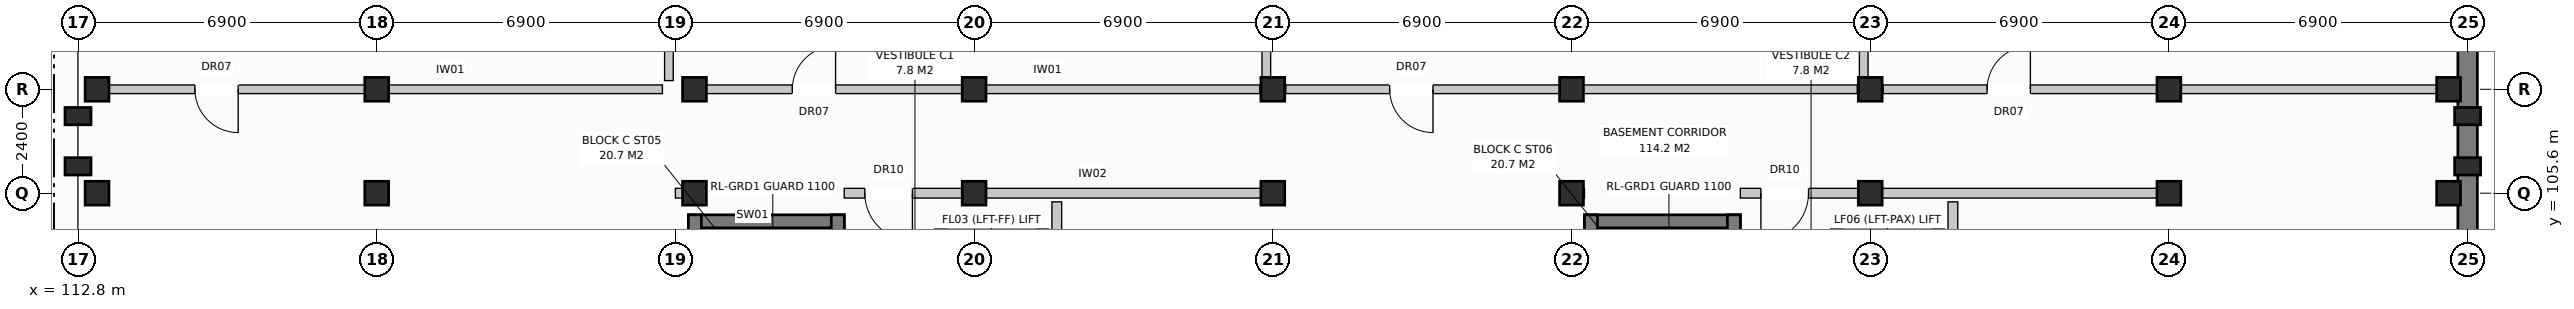
"""IFC4 building model, lengths in metres.
Left out: names, types, materials, properties, quantities, classifications, styles, units other than length and angle.
Written with IfcOpenShell. Run it as: python <this file> out.ifc"""

import sys

from ifc_helpers import new_model, si_unit, direction, frame, frame_2d, origin, origin_with_axes, origin_2d, place, context, subcontext, project, spatial, rectangle, extrude, element, fill, save


model = new_model("IFC4")
c1 = context("Model", 3, precision=1e-05, world=origin(), true_north=direction((0.0, 1.0)))
c2 = subcontext(c1, "Body", "Model", "MODEL_VIEW")
j1 = project(units=[si_unit("LENGTHUNIT", "METRE"), si_unit("PLANEANGLEUNIT", "RADIAN")], contexts=[c1])
p1 = place(None, origin())
s1 = spatial("IfcSite", under=j1, at=p1, CompositionType="ELEMENT")
p2 = place(p1, origin())
s2 = spatial("IfcBuilding", under=s1, at=p2, CompositionType="ELEMENT")
p3 = place(p2, frame((0.0, 0.0, -3.8)))
s3 = spatial("IfcBuildingStorey", under=s2, at=p3, CompositionType="ELEMENT", Elevation=-3.8)
for number, where, z_axis, x_axis in (
    (1, (113.24, 105.6, 0.0), (0.0, 0.0, 1.0), (1.0, 0.0, 0.0)),
    (2, (113.24, 108.0, 0.0), (0.0, 0.0, 1.0), (1.0, 0.0, 0.0)),
    (3, (119.7, 105.6, 0.0), (0.0, 0.0, 1.0), (1.0, 0.0, 0.0)),
    (4, (119.7, 108.0, 0.0), (0.0, 0.0, 1.0), (1.0, 0.0, 0.0)),
    (5, (127.04, 105.6, 0.0), (0.0, 0.0, 1.0), (1.0, 0.0, 0.0)),
    (6, (127.04, 108.0, 0.0), (0.0, 0.0, 1.0), (1.0, 0.0, 0.0)),
    (7, (133.5, 105.6, 0.0), (0.0, 0.0, 1.0), (1.0, 0.0, 0.0)),
    (8, (133.5, 108.0, 0.0), (0.0, 0.0, 1.0), (1.0, 0.0, 0.0)),
    (9, (140.4, 105.6, 0.0), (0.0, 0.0, 1.0), (1.0, 0.0, 0.0)),
    (10, (140.4, 108.0, 0.0), (0.0, 0.0, 1.0), (1.0, 0.0, 0.0)),
    (11, (147.3, 105.6, 0.0), (0.0, 0.0, 1.0), (1.0, 0.0, 0.0)),
    (12, (147.3, 108.0, 0.0), (0.0, 0.0, 1.0), (1.0, 0.0, 0.0)),
    (13, (154.2, 105.6, 0.0), (0.0, 0.0, 1.0), (1.0, 0.0, 0.0)),
    (14, (154.2, 108.0, 0.0), (0.0, 0.0, 1.0), (1.0, 0.0, 0.0)),
    (15, (161.1, 105.6, 0.0), (0.0, 0.0, 1.0), (1.0, 0.0, 0.0)),
    (16, (161.1, 108.0, 0.0), (0.0, 0.0, 1.0), (1.0, 0.0, 0.0)),
    (17, (167.56, 105.6, 0.0), (0.0, 0.0, 1.0), (1.0, 0.0, 0.0)),
    (18, (167.56, 108.0, 0.0), (0.0, 0.0, 1.0), (1.0, 0.0, 0.0)),
):
    element("IfcColumn", number, at=place(p3, frame(where, z_axis=z_axis, x_axis=x_axis)), inside=s3, PredefinedType="COLUMN", context=c2, shape_type="SweptSolid", body=[
        extrude(rectangle(XDim=0.55, YDim=0.55, at=origin_2d()), origin(), (0.0, 0.0, 1.0), 3.8),
    ])
for number, where, z_axis, x_axis in (
    (19, (168.0, 106.22, 0.0), (0.0, 0.0, 1.0), (0.0, 1.0, 0.0)),
    (20, (168.0, 107.38, 0.0), (0.0, 0.0, 1.0), (0.0, 1.0, 0.0)),
    (21, (112.8, 106.22, 0.0), (0.0, 0.0, 1.0), (0.0, 1.0, 0.0)),
    (22, (112.8, 107.38, 0.0), (0.0, 0.0, 1.0), (0.0, 1.0, 0.0)),
):
    element("IfcColumn", number, at=place(p3, frame(where, z_axis=z_axis, x_axis=x_axis)), inside=s3, PredefinedType="PILASTER", context=c2, shape_type="SweptSolid", body=[
        extrude(rectangle(XDim=0.4, YDim=0.6, at=origin_2d()), origin(), (0.0, 0.0, 1.0), 3.8),
    ])
p4 = place(p3, frame((168.0, 0.0, 0.0), z_axis=(0.0, 0.0, 1.0), x_axis=(0.0, 1.0, 0.0)))
e23 = element("IfcWall", 23, at=p4, inside=s3, PredefinedType="STANDARD", context=c2, shape_type="SweptSolid", body=[
    extrude(rectangle(XDim=116.0, YDim=0.45, at=frame_2d((58.0, 0.0))), origin(), (0.0, 0.0, 1.0), 3.48),
])
p5 = place(p3, frame((126.9, 104.95, 0.0), z_axis=(0.0, 0.0, 1.0), x_axis=(1.0, 0.0, 0.0)))
e24 = element("IfcWall", 24, at=p5, inside=s3, PredefinedType="SHEAR", context=c2, shape_type="SweptSolid", body=[
    extrude(rectangle(XDim=3.6, YDim=0.3, at=frame_2d((1.8, 0.0))), origin(), (0.0, 0.0, 1.0), 3.48),
])
p6 = place(p3, frame((127.05, 97.6, 0.0), z_axis=(0.0, 0.0, 1.0), x_axis=(0.0, 1.0, 0.0)))
e25 = element("IfcWall", 25, at=p6, inside=s3, PredefinedType="SHEAR", context=c2, shape_type="SweptSolid", body=[
    extrude(rectangle(XDim=7.5, YDim=0.3, at=frame_2d((3.75, 0.0))), origin(), (0.0, 0.0, 1.0), 3.48),
])
p7 = place(p3, frame((130.35, 97.6, 0.0), z_axis=(0.0, 0.0, 1.0), x_axis=(0.0, 1.0, 0.0)))
e26 = element("IfcWall", 26, at=p7, inside=s3, PredefinedType="SHEAR", context=c2, shape_type="SweptSolid", body=[
    extrude(rectangle(XDim=7.5, YDim=0.3, at=frame_2d((3.75, 0.0))), origin(), (0.0, 0.0, 1.0), 3.48),
])
p8 = place(p7, frame((0.65, 0.0, 0.0)))
e27 = element("IfcOpeningElement", 27, at=p8, cuts=e26, PredefinedType="OPENING", context=c2, shape_type="SweptSolid", body=[
    extrude(rectangle(XDim=1.15, YDim=2.15, at=frame_2d((0.575, 1.075))), frame((0.0, 0.162, 0.0), z_axis=(0.0, -1.0, 0.0), x_axis=(1.0, 0.0, 0.0)), (0.0, 0.0, 1.0), 0.324),
])
p9 = place(p3, frame((135.41, 97.8, 0.0), z_axis=(0.0, 0.0, 1.0), x_axis=(0.0, 1.0, 0.0)))
e28 = element("IfcWall", 28, at=p9, inside=s3, PredefinedType="PARTITIONING", context=c2, shape_type="SweptSolid", body=[
    extrude(rectangle(XDim=7.6, YDim=0.225, at=frame_2d((3.8, 0.0))), origin(), (0.0, 0.0, 1.0), 3.19),
])
p10 = place(p3, frame((126.6, 105.6, 0.0), z_axis=(0.0, 0.0, 1.0), x_axis=(1.0, 0.0, 0.0)))
e29 = element("IfcWall", 29, at=p10, inside=s3, PredefinedType="PARTITIONING", context=c2, shape_type="SweptSolid", body=[
    extrude(rectangle(XDim=0.3, YDim=0.225, at=frame_2d((0.15, 0.0))), origin(), (0.0, 0.0, 1.0), 3.48),
])
p11 = place(p3, frame((130.5, 105.6, 0.0), z_axis=(0.0, 0.0, 1.0), x_axis=(1.0, 0.0, 0.0)))
e30 = element("IfcWall", 30, at=p11, inside=s3, PredefinedType="PARTITIONING", context=c2, shape_type="SweptSolid", body=[
    extrude(rectangle(XDim=9.9, YDim=0.225, at=frame_2d((4.95, 0.0))), origin(), (0.0, 0.0, 1.0), 2.92),
])
p12 = place(p11, frame((0.475, 0.0, 0.0)))
e31 = element("IfcOpeningElement", 31, at=p12, cuts=e30, PredefinedType="OPENING", context=c2, shape_type="SweptSolid", body=[
    extrude(rectangle(XDim=1.1, YDim=2.15, at=frame_2d((0.55, 1.075))), frame((0.0, 0.125, 0.0), z_axis=(0.0, -1.0, 0.0), x_axis=(1.0, 0.0, 0.0)), (0.0, 0.0, 1.0), 0.249),
])
p13 = place(p3, frame((147.6, 104.95, 0.0), z_axis=(0.0, 0.0, 1.0), x_axis=(1.0, 0.0, 0.0)))
e32 = element("IfcWall", 32, at=p13, inside=s3, PredefinedType="SHEAR", context=c2, shape_type="SweptSolid", body=[
    extrude(rectangle(XDim=3.6, YDim=0.3, at=frame_2d((1.8, 0.0))), origin(), (0.0, 0.0, 1.0), 3.48),
])
p14 = place(p3, frame((147.75, 97.6, 0.0), z_axis=(0.0, 0.0, 1.0), x_axis=(0.0, 1.0, 0.0)))
e33 = element("IfcWall", 33, at=p14, inside=s3, PredefinedType="SHEAR", context=c2, shape_type="SweptSolid", body=[
    extrude(rectangle(XDim=7.5, YDim=0.3, at=frame_2d((3.75, 0.0))), origin(), (0.0, 0.0, 1.0), 3.48),
])
p15 = place(p3, frame((151.05, 97.6, 0.0), z_axis=(0.0, 0.0, 1.0), x_axis=(0.0, 1.0, 0.0)))
e34 = element("IfcWall", 34, at=p15, inside=s3, PredefinedType="SHEAR", context=c2, shape_type="SweptSolid", body=[
    extrude(rectangle(XDim=7.5, YDim=0.3, at=frame_2d((3.75, 0.0))), origin(), (0.0, 0.0, 1.0), 3.48),
])
p16 = place(p15, frame((0.65, 0.0, 0.0)))
e35 = element("IfcOpeningElement", 35, at=p16, cuts=e34, PredefinedType="OPENING", context=c2, shape_type="SweptSolid", body=[
    extrude(rectangle(XDim=1.15, YDim=2.15, at=frame_2d((0.575, 1.075))), frame((0.0, 0.162, 0.0), z_axis=(0.0, -1.0, 0.0), x_axis=(1.0, 0.0, 0.0)), (0.0, 0.0, 1.0), 0.324),
])
p17 = place(p3, frame((156.11, 97.8, 0.0), z_axis=(0.0, 0.0, 1.0), x_axis=(0.0, 1.0, 0.0)))
e36 = element("IfcWall", 36, at=p17, inside=s3, PredefinedType="PARTITIONING", context=c2, shape_type="SweptSolid", body=[
    extrude(rectangle(XDim=7.6, YDim=0.225, at=frame_2d((3.8, 0.0))), origin(), (0.0, 0.0, 1.0), 3.19),
])
p18 = place(p3, frame((147.3, 105.6, 0.0), z_axis=(0.0, 0.0, 1.0), x_axis=(1.0, 0.0, 0.0)))
e37 = element("IfcWall", 37, at=p18, inside=s3, PredefinedType="PARTITIONING", context=c2, shape_type="SweptSolid", body=[
    extrude(rectangle(XDim=0.3, YDim=0.225, at=frame_2d((0.15, 0.0))), origin(), (0.0, 0.0, 1.0), 3.48),
])
p19 = place(p3, frame((151.2, 105.6, 0.0), z_axis=(0.0, 0.0, 1.0), x_axis=(1.0, 0.0, 0.0)))
e38 = element("IfcWall", 38, at=p19, inside=s3, PredefinedType="PARTITIONING", context=c2, shape_type="SweptSolid", body=[
    extrude(rectangle(XDim=9.9, YDim=0.225, at=frame_2d((4.95, 0.0))), origin(), (0.0, 0.0, 1.0), 2.92),
])
p20 = place(p19, frame((0.475, 0.0, 0.0)))
e39 = element("IfcOpeningElement", 39, at=p20, cuts=e38, PredefinedType="OPENING", context=c2, shape_type="SweptSolid", body=[
    extrude(rectangle(XDim=1.1, YDim=2.15, at=frame_2d((0.55, 1.075))), frame((0.0, 0.125, 0.0), z_axis=(0.0, -1.0, 0.0), x_axis=(1.0, 0.0, 0.0)), (0.0, 0.0, 1.0), 0.249),
])
p21 = place(p3, frame((113.1, 108.0, 0.0), z_axis=(0.0, 0.0, 1.0), x_axis=(1.0, 0.0, 0.0)))
e40 = element("IfcWall", 40, at=p21, inside=s3, PredefinedType="PARTITIONING", context=c2, shape_type="SweptSolid", body=[
    extrude(rectangle(XDim=13.2, YDim=0.2, at=frame_2d((6.6, 0.0))), origin(), (0.0, 0.0, 1.0), 2.92),
])
p22 = place(p21, frame((2.4, 0.0, 0.0)))
e41 = element("IfcOpeningElement", 41, at=p22, cuts=e40, PredefinedType="OPENING", context=c2, shape_type="SweptSolid", body=[
    extrude(rectangle(XDim=1.0, YDim=2.15, at=frame_2d((0.5, 1.075))), frame((0.0, 0.112, 0.0), z_axis=(0.0, -1.0, 0.0), x_axis=(1.0, 0.0, 0.0)), (0.0, 0.0, 1.0), 0.224),
])
p23 = place(p3, frame((126.45, 108.2, 0.0), z_axis=(0.0, 0.0, 1.0), x_axis=(0.0, 1.0, 0.0)))
e42 = element("IfcWall", 42, at=p23, inside=s3, PredefinedType="PARTITIONING", context=c2, shape_type="SweptSolid", body=[
    extrude(rectangle(XDim=7.5, YDim=0.2, at=frame_2d((3.75, 0.0))), origin(), (0.0, 0.0, 1.0), 3.48),
])
p24 = place(p3, frame((126.9, 108.0, 0.0), z_axis=(0.0, 0.0, 1.0), x_axis=(1.0, 0.0, 0.0)))
e43 = element("IfcWall", 43, at=p24, inside=s3, PredefinedType="PARTITIONING", context=c2, shape_type="SweptSolid", body=[
    extrude(rectangle(XDim=13.2, YDim=0.2, at=frame_2d((6.6, 0.0))), origin(), (0.0, 0.0, 1.0), 2.92),
])
p25 = place(p24, frame((2.4, 0.0, 0.0)))
e44 = element("IfcOpeningElement", 44, at=p25, cuts=e43, PredefinedType="OPENING", context=c2, shape_type="SweptSolid", body=[
    extrude(rectangle(XDim=1.0, YDim=2.15, at=frame_2d((0.5, 1.075))), frame((0.0, 0.112, 0.0), z_axis=(0.0, -1.0, 0.0), x_axis=(1.0, 0.0, 0.0)), (0.0, 0.0, 1.0), 0.224),
])
p26 = place(p3, frame((140.25, 108.2, 0.0), z_axis=(0.0, 0.0, 1.0), x_axis=(0.0, 1.0, 0.0)))
e45 = element("IfcWall", 45, at=p26, inside=s3, PredefinedType="PARTITIONING", context=c2, shape_type="SweptSolid", body=[
    extrude(rectangle(XDim=7.5, YDim=0.2, at=frame_2d((3.75, 0.0))), origin(), (0.0, 0.0, 1.0), 3.48),
])
p27 = place(p3, frame((140.7, 108.0, 0.0), z_axis=(0.0, 0.0, 1.0), x_axis=(1.0, 0.0, 0.0)))
e46 = element("IfcWall", 46, at=p27, inside=s3, PredefinedType="PARTITIONING", context=c2, shape_type="SweptSolid", body=[
    extrude(rectangle(XDim=13.2, YDim=0.2, at=frame_2d((6.6, 0.0))), origin(), (0.0, 0.0, 1.0), 2.92),
])
p28 = place(p27, frame((2.4, 0.0, 0.0)))
e47 = element("IfcOpeningElement", 47, at=p28, cuts=e46, PredefinedType="OPENING", context=c2, shape_type="SweptSolid", body=[
    extrude(rectangle(XDim=1.0, YDim=2.15, at=frame_2d((0.5, 1.075))), frame((0.0, 0.112, 0.0), z_axis=(0.0, -1.0, 0.0), x_axis=(1.0, 0.0, 0.0)), (0.0, 0.0, 1.0), 0.224),
])
p29 = place(p3, frame((154.05, 108.2, 0.0), z_axis=(0.0, 0.0, 1.0), x_axis=(0.0, 1.0, 0.0)))
e48 = element("IfcWall", 48, at=p29, inside=s3, PredefinedType="PARTITIONING", context=c2, shape_type="SweptSolid", body=[
    extrude(rectangle(XDim=7.5, YDim=0.2, at=frame_2d((3.75, 0.0))), origin(), (0.0, 0.0, 1.0), 3.48),
])
p30 = place(p3, frame((154.5, 108.0, 0.0), z_axis=(0.0, 0.0, 1.0), x_axis=(1.0, 0.0, 0.0)))
e49 = element("IfcWall", 49, at=p30, inside=s3, PredefinedType="PARTITIONING", context=c2, shape_type="SweptSolid", body=[
    extrude(rectangle(XDim=13.2, YDim=0.2, at=frame_2d((6.6, 0.0))), origin(), (0.0, 0.0, 1.0), 2.92),
])
p31 = place(p30, frame((2.4, 0.0, 0.0)))
e50 = element("IfcOpeningElement", 50, at=p31, cuts=e49, PredefinedType="OPENING", context=c2, shape_type="SweptSolid", body=[
    extrude(rectangle(XDim=1.0, YDim=2.15, at=frame_2d((0.5, 1.075))), frame((0.0, 0.112, 0.0), z_axis=(0.0, -1.0, 0.0), x_axis=(1.0, 0.0, 0.0)), (0.0, 0.0, 1.0), 0.224),
])
p32 = place(p12, frame((1.1, 0.0, 0.0), z_axis=(0.0, 0.0, 1.0), x_axis=(-1.0, 0.0, 0.0)))
e51 = element("IfcDoor", 51, at=p32, inside=s3, OperationType="SINGLE_SWING_RIGHT", PredefinedType="DOOR", context=c2, shape_type="SweptSolid", body=[
    extrude(rectangle(XDim=1.1, YDim=2.15, at=frame_2d((0.55, 1.075))), frame((0.0, 0.025, 0.0), z_axis=(0.0, -1.0, 0.0), x_axis=(1.0, 0.0, 0.0)), (0.0, 0.0, 1.0), 0.05),
])
fill(e31, e51)
p33 = place(p20, frame((1.1, 0.0, 0.0), z_axis=(0.0, 0.0, 1.0), x_axis=(-1.0, 0.0, 0.0)))
e52 = element("IfcDoor", 52, at=p33, inside=s3, OperationType="SINGLE_SWING_LEFT", PredefinedType="DOOR", context=c2, shape_type="SweptSolid", body=[
    extrude(rectangle(XDim=1.1, YDim=2.15, at=frame_2d((0.55, 1.075))), frame((0.0, 0.025, 0.0), z_axis=(0.0, -1.0, 0.0), x_axis=(1.0, 0.0, 0.0)), (0.0, 0.0, 1.0), 0.05),
])
fill(e39, e52)
p34 = place(p22, frame((1.0, 0.0, 0.0), z_axis=(0.0, 0.0, 1.0), x_axis=(-1.0, 0.0, 0.0)))
e53 = element("IfcDoor", 53, at=p34, inside=s3, OperationType="SINGLE_SWING_RIGHT", PredefinedType="DOOR", context=c2, shape_type="SweptSolid", body=[
    extrude(rectangle(XDim=1.0, YDim=2.15, at=frame_2d((0.5, 1.075))), frame((0.0, 0.025, 0.0), z_axis=(0.0, -1.0, 0.0), x_axis=(1.0, 0.0, 0.0)), (0.0, 0.0, 1.0), 0.05),
])
fill(e41, e53)
p35 = place(p25, origin_with_axes())
e54 = element("IfcDoor", 54, at=p35, inside=s3, OperationType="SINGLE_SWING_RIGHT", PredefinedType="DOOR", context=c2, shape_type="SweptSolid", body=[
    extrude(rectangle(XDim=1.0, YDim=2.15, at=frame_2d((0.5, 1.075))), frame((0.0, 0.025, 0.0), z_axis=(0.0, -1.0, 0.0), x_axis=(1.0, 0.0, 0.0)), (0.0, 0.0, 1.0), 0.05),
])
fill(e44, e54)
p36 = place(p28, frame((1.0, 0.0, 0.0), z_axis=(0.0, 0.0, 1.0), x_axis=(-1.0, 0.0, 0.0)))
e55 = element("IfcDoor", 55, at=p36, inside=s3, OperationType="SINGLE_SWING_RIGHT", PredefinedType="DOOR", context=c2, shape_type="SweptSolid", body=[
    extrude(rectangle(XDim=1.0, YDim=2.15, at=frame_2d((0.5, 1.075))), frame((0.0, 0.025, 0.0), z_axis=(0.0, -1.0, 0.0), x_axis=(1.0, 0.0, 0.0)), (0.0, 0.0, 1.0), 0.05),
])
fill(e47, e55)
p37 = place(p31, origin_with_axes())
e56 = element("IfcDoor", 56, at=p37, inside=s3, OperationType="SINGLE_SWING_RIGHT", PredefinedType="DOOR", context=c2, shape_type="SweptSolid", body=[
    extrude(rectangle(XDim=1.0, YDim=2.15, at=frame_2d((0.5, 1.075))), frame((0.0, 0.025, 0.0), z_axis=(0.0, -1.0, 0.0), x_axis=(1.0, 0.0, 0.0)), (0.0, 0.0, 1.0), 0.05),
])
fill(e50, e56)
save(model, sys.argv[1])
